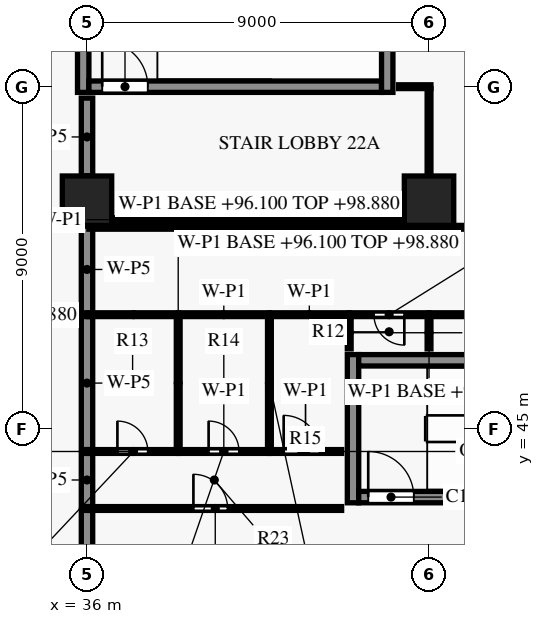
"""IFC4 building model, lengths in metres.
Left out: names, types, materials, properties, quantities, classifications, styles, units other than length and angle.
Written with IfcOpenShell. Run it as: python <this file> out.ifc"""

import sys

from ifc_helpers import new_model, si_unit, direction, frame, frame_2d, origin, origin_2d, place, context, subcontext, project, spatial, rectangle, extrude, element, fill, save


model = new_model("IFC4")
c1 = context("Model", 3, precision=1e-05, world=origin(), true_north=direction((0.0, 1.0)))
c2 = subcontext(c1, "Body", "Model", "MODEL_VIEW")
j1 = project(units=[si_unit("LENGTHUNIT", "METRE"), si_unit("PLANEANGLEUNIT", "RADIAN")], contexts=[c1])
p1 = place(None, origin())
s1 = spatial("IfcSite", under=j1, at=p1, CompositionType="ELEMENT")
p2 = place(p1, origin())
s2 = spatial("IfcBuilding", under=s1, at=p2, CompositionType="ELEMENT")
p3 = place(p2, frame((0.0, 0.0, 96.1)))
s3 = spatial("IfcBuildingStorey", under=s2, at=p3, CompositionType="ELEMENT", Elevation=96.1)
for number, where, z_axis, x_axis in (
    (1, (36.0, 51.0, 0.0), (0.0, 0.0, 1.0), (1.0, 0.0, 0.0)),
    (2, (45.0, 51.0, 0.0), (0.0, 0.0, 1.0), (1.0, 0.0, 0.0)),
):
    element("IfcColumn", number, at=place(p3, frame(where, z_axis=z_axis, x_axis=x_axis)), inside=s3, PredefinedType="COLUMN", context=c2, shape_type="SweptSolid", body=[
        extrude(rectangle(XDim=1.3, YDim=1.3, at=origin_2d()), origin(), (0.0, 0.0, 1.0), 3.8),
    ])
p4 = place(p3, frame((43.15, 43.2, 0.0), z_axis=(0.0, 0.0, 1.0), x_axis=(1.0, 0.0, 0.0)))
e3 = element("IfcWall", 3, at=p4, inside=s3, PredefinedType="SHEAR", context=c2, shape_type="SweptSolid", body=[
    extrude(rectangle(XDim=7.7, YDim=0.3, at=frame_2d((3.85, 0.0))), origin(), (0.0, 0.0, 1.0), 3.5),
])
p5 = place(p4, frame((0.25, 0.0, 0.0)))
e4 = element("IfcOpeningElement", 4, at=p5, cuts=e3, PredefinedType="OPENING", context=c2, shape_type="SweptSolid", body=[
    extrude(rectangle(XDim=1.2, YDim=2.2, at=frame_2d((0.6, 1.1))), frame((0.0, 0.16, 0.0), z_axis=(0.0, -1.0, 0.0), x_axis=(1.0, 0.0, 0.0)), (0.0, 0.0, 1.0), 0.32),
])
p6 = place(p3, frame((43.15, 46.8, 0.0), z_axis=(0.0, 0.0, 1.0), x_axis=(1.0, 0.0, 0.0)))
e5 = element("IfcWall", 5, at=p6, inside=s3, PredefinedType="SHEAR", context=c2, shape_type="SweptSolid", body=[
    extrude(rectangle(XDim=7.7, YDim=0.3, at=frame_2d((3.85, 0.0))), origin(), (0.0, 0.0, 1.0), 3.5),
])
p7 = place(p3, frame((36.05, 54.0, 0.0), z_axis=(0.0, 0.0, 1.0), x_axis=(1.0, 0.0, 0.0)))
e6 = element("IfcWall", 6, at=p7, inside=s3, PredefinedType="SHEAR", context=c2, shape_type="SweptSolid", body=[
    extrude(rectangle(XDim=7.7, YDim=0.3, at=frame_2d((3.85, 0.0))), origin(), (0.0, 0.0, 1.0), 3.5),
])
p8 = place(p7, frame((0.35, 0.0, 0.0)))
e7 = element("IfcOpeningElement", 7, at=p8, cuts=e6, PredefinedType="OPENING", context=c2, shape_type="SweptSolid", body=[
    extrude(rectangle(XDim=1.2, YDim=2.2, at=frame_2d((0.6, 1.1))), frame((0.0, 0.16, 0.0), z_axis=(0.0, -1.0, 0.0), x_axis=(1.0, 0.0, 0.0)), (0.0, 0.0, 1.0), 0.32),
])
for number, where, z_axis, x_axis in (
    (8, (35.9, 53.85, 0.0), (0.0, 0.0, 1.0), (0.0, 1.0, 0.0)),
    (9, (43.0, 43.05, 0.0), (0.0, 0.0, 1.0), (0.0, 1.0, 0.0)),
    (10, (43.9, 53.85, 0.0), (0.0, 0.0, 1.0), (0.0, 1.0, 0.0)),
):
    element("IfcWall", number, at=place(p3, frame(where, z_axis=z_axis, x_axis=x_axis)), inside=s3, PredefinedType="SHEAR", context=c2, shape_type="SweptSolid", body=[
        extrude(rectangle(XDim=3.9, YDim=0.3, at=frame_2d((1.95, 0.0))), origin(), (0.0, 0.0, 1.0), 3.5),
    ])
p9 = place(p3, frame((36.0, 39.67, 0.0), z_axis=(0.0, 0.0, 1.0), x_axis=(0.0, 1.0, 0.0)))
e11 = element("IfcWall", 11, at=p9, inside=s3, PredefinedType="PARTITIONING", context=c2, shape_type="SweptSolid", body=[
    extrude(rectangle(XDim=3.18, YDim=0.3, at=frame_2d((1.59, 0.0))), origin(), (0.0, 0.0, 1.0), 2.78),
])
p10 = place(p3, frame((36.05, 42.9, 0.0), z_axis=(0.0, 0.0, 1.0), x_axis=(1.0, 0.0, 0.0)))
e12 = element("IfcWall", 12, at=p10, inside=s3, PredefinedType="PARTITIONING", context=c2, shape_type="SweptSolid", body=[
    extrude(rectangle(XDim=6.65, YDim=0.1, at=frame_2d((3.325, 0.0))), origin(), (0.0, 0.0, 1.0), 2.78),
])
p11 = place(p10, frame((2.75, 0.0, 0.0)))
e13 = element("IfcOpeningElement", 13, at=p11, cuts=e12, PredefinedType="OPENING", context=c2, shape_type="SweptSolid", body=[
    extrude(rectangle(XDim=0.9, YDim=2.1, at=frame_2d((0.45, 1.05))), frame((0.0, 0.06, 0.0), z_axis=(0.0, -1.0, 0.0), x_axis=(1.0, 0.0, 0.0)), (0.0, 0.0, 1.0), 0.12),
])
p12 = place(p3, frame((36.0, 42.95, 0.0), z_axis=(0.0, 0.0, 1.0), x_axis=(0.0, 1.0, 0.0)))
e14 = element("IfcWall", 14, at=p12, inside=s3, PredefinedType="PARTITIONING", context=c2, shape_type="SweptSolid", body=[
    extrude(rectangle(XDim=1.4, YDim=0.3, at=frame_2d((0.7, 0.0))), origin(), (0.0, 0.0, 1.0), 2.78),
])
p13 = place(p3, frame((36.05, 44.4, 0.0), z_axis=(0.0, 0.0, 1.0), x_axis=(1.0, 0.0, 0.0)))
e15 = element("IfcWall", 15, at=p13, inside=s3, PredefinedType="PARTITIONING", context=c2, shape_type="SweptSolid", body=[
    extrude(rectangle(XDim=2.35, YDim=0.1, at=frame_2d((1.175, 0.0))), origin(), (0.0, 0.0, 1.0), 2.78),
])
p14 = place(p13, frame((0.75, 0.0, 0.0)))
e16 = element("IfcOpeningElement", 16, at=p14, cuts=e15, PredefinedType="OPENING", context=c2, shape_type="SweptSolid", body=[
    extrude(rectangle(XDim=0.8, YDim=2.1, at=frame_2d((0.4, 1.05))), frame((0.0, 0.06, 0.0), z_axis=(0.0, -1.0, 0.0), x_axis=(1.0, 0.0, 0.0)), (0.0, 0.0, 1.0), 0.12),
])
p15 = place(p3, frame((38.4, 44.4, 0.0), z_axis=(0.0, 0.0, 1.0), x_axis=(1.0, 0.0, 0.0)))
e17 = element("IfcWall", 17, at=p15, inside=s3, PredefinedType="PARTITIONING", context=c2, shape_type="SweptSolid", body=[
    extrude(rectangle(XDim=2.4, YDim=0.1, at=frame_2d((1.2, 0.0))), origin(), (0.0, 0.0, 1.0), 3.48),
])
p16 = place(p15, frame((0.8, 0.0, 0.0)))
e18 = element("IfcOpeningElement", 18, at=p16, cuts=e17, PredefinedType="OPENING", context=c2, shape_type="SweptSolid", body=[
    extrude(rectangle(XDim=0.8, YDim=2.1, at=frame_2d((0.4, 1.05))), frame((0.0, 0.06, 0.0), z_axis=(0.0, -1.0, 0.0), x_axis=(1.0, 0.0, 0.0)), (0.0, 0.0, 1.0), 0.12),
])
p17 = place(p3, frame((40.8, 44.4, 0.0), z_axis=(0.0, 0.0, 1.0), x_axis=(1.0, 0.0, 0.0)))
e19 = element("IfcWall", 19, at=p17, inside=s3, PredefinedType="PARTITIONING", context=c2, shape_type="SweptSolid", body=[
    extrude(rectangle(XDim=1.9, YDim=0.1, at=frame_2d((0.95, 0.0))), origin(), (0.0, 0.0, 1.0), 3.48),
])
p18 = place(p17, frame((0.375, 0.0, 0.0)))
e20 = element("IfcOpeningElement", 20, at=p18, cuts=e19, PredefinedType="OPENING", context=c2, shape_type="SweptSolid", body=[
    extrude(rectangle(XDim=0.95, YDim=2.1, at=frame_2d((0.475, 1.05))), frame((0.0, 0.06, 0.0), z_axis=(0.0, -1.0, 0.0), x_axis=(1.0, 0.0, 0.0)), (0.0, 0.0, 1.0), 0.12),
])
p19 = place(p3, frame((36.0, 44.45, 0.0), z_axis=(0.0, 0.0, 1.0), x_axis=(0.0, 1.0, 0.0)))
e21 = element("IfcWall", 21, at=p19, inside=s3, PredefinedType="PARTITIONING", context=c2, shape_type="SweptSolid", body=[
    extrude(rectangle(XDim=3.5, YDim=0.3, at=frame_2d((1.75, 0.0))), origin(), (0.0, 0.0, 1.0), 2.78),
])
for number, where, z_axis, x_axis in (
    (22, (38.4, 47.95, 0.0), (0.0, 0.0, 1.0), (0.0, -1.0, 0.0)),
    (23, (40.8, 47.95, 0.0), (0.0, 0.0, 1.0), (0.0, -1.0, 0.0)),
):
    element("IfcWall", number, at=place(p3, frame(where, z_axis=z_axis, x_axis=x_axis)), inside=s3, PredefinedType="PARTITIONING", context=c2, shape_type="SweptSolid", body=[
        extrude(rectangle(XDim=3.5, YDim=0.1, at=frame_2d((1.75, 0.0))), origin(), (0.0, 0.0, 1.0), 2.78),
    ])
for number, where, z_axis, x_axis in (
    (24, (42.9, 47.95, 0.0), (0.0, 0.0, 1.0), (0.0, -1.0, 0.0)),
    (25, (45.0, 47.95, 0.0), (0.0, 0.0, 1.0), (0.0, -1.0, 0.0)),
):
    element("IfcWall", number, at=place(p3, frame(where, z_axis=z_axis, x_axis=x_axis)), inside=s3, PredefinedType="PARTITIONING", context=c2, shape_type="SweptSolid", body=[
        extrude(rectangle(XDim=0.85, YDim=0.1, at=frame_2d((0.425, 0.0))), origin(), (0.0, 0.0, 1.0), 2.78),
    ])
p20 = place(p3, frame((38.4, 48.0, 0.0), z_axis=(0.0, 0.0, 1.0), x_axis=(-1.0, 0.0, 0.0)))
e26 = element("IfcWall", 26, at=p20, inside=s3, PredefinedType="PARTITIONING", context=c2, shape_type="SweptSolid", body=[
    extrude(rectangle(XDim=2.35, YDim=0.1, at=frame_2d((1.175, 0.0))), origin(), (0.0, 0.0, 1.0), 2.78),
])
p21 = place(p3, frame((40.8, 48.0, 0.0), z_axis=(0.0, 0.0, 1.0), x_axis=(-1.0, 0.0, 0.0)))
e27 = element("IfcWall", 27, at=p21, inside=s3, PredefinedType="PARTITIONING", context=c2, shape_type="SweptSolid", body=[
    extrude(rectangle(XDim=2.4, YDim=0.1, at=frame_2d((1.2, 0.0))), origin(), (0.0, 0.0, 1.0), 3.48),
])
p22 = place(p3, frame((42.9, 48.0, 0.0), z_axis=(0.0, 0.0, 1.0), x_axis=(-1.0, 0.0, 0.0)))
e28 = element("IfcWall", 28, at=p22, inside=s3, PredefinedType="PARTITIONING", context=c2, shape_type="SweptSolid", body=[
    extrude(rectangle(XDim=2.1, YDim=0.1, at=frame_2d((1.05, 0.0))), origin(), (0.0, 0.0, 1.0), 3.48),
])
p23 = place(p3, frame((45.0, 48.0, 0.0), z_axis=(0.0, 0.0, 1.0), x_axis=(-1.0, 0.0, 0.0)))
e29 = element("IfcWall", 29, at=p23, inside=s3, PredefinedType="PARTITIONING", context=c2, shape_type="SweptSolid", body=[
    extrude(rectangle(XDim=2.1, YDim=0.1, at=frame_2d((1.05, 0.0))), origin(), (0.0, 0.0, 1.0), 2.88),
])
p24 = place(p23, frame((0.65, 0.0, 0.0)))
e30 = element("IfcOpeningElement", 30, at=p24, cuts=e29, PredefinedType="OPENING", context=c2, shape_type="SweptSolid", body=[
    extrude(rectangle(XDim=0.8, YDim=2.1, at=frame_2d((0.4, 1.05))), frame((0.0, 0.06, 0.0), z_axis=(0.0, -1.0, 0.0), x_axis=(1.0, 0.0, 0.0)), (0.0, 0.0, 1.0), 0.12),
])
p25 = place(p3, frame((54.0, 48.0, 0.0), z_axis=(0.0, 0.0, 1.0), x_axis=(-1.0, 0.0, 0.0)))
e31 = element("IfcWall", 31, at=p25, inside=s3, PredefinedType="PARTITIONING", context=c2, shape_type="SweptSolid", body=[
    extrude(rectangle(XDim=9.0, YDim=0.1, at=frame_2d((4.5, 0.0))), origin(), (0.0, 0.0, 1.0), 2.88),
])
p26 = place(p3, frame((36.0, 48.05, 0.0), z_axis=(0.0, 0.0, 1.0), x_axis=(0.0, 1.0, 0.0)))
e32 = element("IfcWall", 32, at=p26, inside=s3, PredefinedType="PARTITIONING", context=c2, shape_type="SweptSolid", body=[
    extrude(rectangle(XDim=2.28, YDim=0.3, at=frame_2d((1.14, 0.0))), origin(), (0.0, 0.0, 1.0), 2.78),
])
p27 = place(p3, frame((36.05, 50.3, 0.0), z_axis=(0.0, 0.0, 1.0), x_axis=(1.0, 0.0, 0.0)))
e33 = element("IfcWall", 33, at=p27, inside=s3, PredefinedType="PARTITIONING", context=c2, shape_type="SweptSolid", body=[
    extrude(rectangle(XDim=8.95, YDim=0.1, at=frame_2d((4.475, 0.0))), origin(), (0.0, 0.0, 1.0), 2.78),
])
p28 = place(p3, frame((45.0, 50.3, 0.0), z_axis=(0.0, 0.0, 1.0), x_axis=(1.0, 0.0, 0.0)))
e34 = element("IfcWall", 34, at=p28, inside=s3, PredefinedType="PARTITIONING", context=c2, shape_type="SweptSolid", body=[
    extrude(rectangle(XDim=13.5, YDim=0.1, at=frame_2d((6.75, 0.0))), origin(), (0.0, 0.0, 1.0), 2.88),
])
p29 = place(p28, frame((4.05, 0.0, 0.0)))
e35 = element("IfcOpeningElement", 35, at=p29, cuts=e34, PredefinedType="OPENING", context=c2, shape_type="SweptSolid", body=[
    extrude(rectangle(XDim=0.9, YDim=2.1, at=frame_2d((0.45, 1.05))), frame((0.0, 0.06, 0.0), z_axis=(0.0, -1.0, 0.0), x_axis=(1.0, 0.0, 0.0)), (0.0, 0.0, 1.0), 0.12),
])
p30 = place(p3, frame((44.345, 50.5, 0.0), z_axis=(0.0, 0.0, 1.0), x_axis=(-1.0, 0.0, 0.0)))
e36 = element("IfcWall", 36, at=p30, inside=s3, PredefinedType="PARTITIONING", context=c2, shape_type="SweptSolid", body=[
    extrude(rectangle(XDim=7.69, YDim=0.1, at=frame_2d((3.845, 0.0))), origin(), (0.0, 0.0, 1.0), 3.48),
])
p31 = place(p3, frame((36.0, 51.655, 0.0), z_axis=(0.0, 0.0, 1.0), x_axis=(0.0, 1.0, 0.0)))
e37 = element("IfcWall", 37, at=p31, inside=s3, PredefinedType="PARTITIONING", context=c2, shape_type="SweptSolid", body=[
    extrude(rectangle(XDim=2.045, YDim=0.3, at=frame_2d((1.022, 0.0))), origin(), (0.0, 0.0, 1.0), 2.78),
])
p32 = place(p3, frame((45.0, 53.95, 0.0), z_axis=(0.0, 0.0, 1.0), x_axis=(0.0, -1.0, 0.0)))
e38 = element("IfcWall", 38, at=p32, inside=s3, PredefinedType="PARTITIONING", context=c2, shape_type="SweptSolid", body=[
    extrude(rectangle(XDim=2.295, YDim=0.1, at=frame_2d((1.147, 0.0))), origin(), (0.0, 0.0, 1.0), 2.88),
])
p33 = place(p3, frame((44.2, 54.0, 0.0), z_axis=(0.0, 0.0, 1.0), x_axis=(1.0, 0.0, 0.0)))
e39 = element("IfcWall", 39, at=p33, inside=s3, PredefinedType="PARTITIONING", context=c2, shape_type="SweptSolid", body=[
    extrude(rectangle(XDim=0.85, YDim=0.1, at=frame_2d((0.425, 0.0))), origin(), (0.0, 0.0, 1.0), 2.88),
])
p34 = place(p8, origin())
e40 = element("IfcDoor", 40, at=p34, inside=s3, OperationType="SINGLE_SWING_LEFT", PredefinedType="DOOR", context=c2, shape_type="SweptSolid", body=[
    extrude(rectangle(XDim=1.2, YDim=2.2, at=frame_2d((0.6, 1.1))), frame((0.0, 0.025, 0.0), z_axis=(0.0, -1.0, 0.0), x_axis=(1.0, 0.0, 0.0)), (0.0, 0.0, 1.0), 0.05),
])
fill(e7, e40)
p35 = place(p5, origin())
e41 = element("IfcDoor", 41, at=p35, inside=s3, OperationType="SINGLE_SWING_RIGHT", PredefinedType="DOOR", context=c2, shape_type="SweptSolid", body=[
    extrude(rectangle(XDim=1.2, YDim=2.2, at=frame_2d((0.6, 1.1))), frame((0.0, 0.025, 0.0), z_axis=(0.0, -1.0, 0.0), x_axis=(1.0, 0.0, 0.0)), (0.0, 0.0, 1.0), 0.05),
])
fill(e4, e41)
p36 = place(p11, origin())
e42 = element("IfcDoor", 42, at=p36, inside=s3, OperationType="SINGLE_SWING_LEFT", PredefinedType="DOOR", context=c2, shape_type="SweptSolid", body=[
    extrude(rectangle(XDim=0.9, YDim=2.1, at=frame_2d((0.45, 1.05))), frame((0.0, 0.025, 0.0), z_axis=(0.0, -1.0, 0.0), x_axis=(1.0, 0.0, 0.0)), (0.0, 0.0, 1.0), 0.05),
])
fill(e13, e42)
p37 = place(p14, origin())
e43 = element("IfcDoor", 43, at=p37, inside=s3, OperationType="SINGLE_SWING_LEFT", PredefinedType="DOOR", context=c2, shape_type="SweptSolid", body=[
    extrude(rectangle(XDim=0.8, YDim=2.1, at=frame_2d((0.4, 1.05))), frame((0.0, 0.025, 0.0), z_axis=(0.0, -1.0, 0.0), x_axis=(1.0, 0.0, 0.0)), (0.0, 0.0, 1.0), 0.05),
])
fill(e16, e43)
p38 = place(p16, origin())
e44 = element("IfcDoor", 44, at=p38, inside=s3, OperationType="SINGLE_SWING_RIGHT", PredefinedType="DOOR", context=c2, shape_type="SweptSolid", body=[
    extrude(rectangle(XDim=0.8, YDim=2.1, at=frame_2d((0.4, 1.05))), frame((0.0, 0.025, 0.0), z_axis=(0.0, -1.0, 0.0), x_axis=(1.0, 0.0, 0.0)), (0.0, 0.0, 1.0), 0.05),
])
fill(e18, e44)
p39 = place(p18, origin())
e45 = element("IfcDoor", 45, at=p39, inside=s3, OperationType="SINGLE_SWING_LEFT", PredefinedType="DOOR", context=c2, shape_type="SweptSolid", body=[
    extrude(rectangle(XDim=0.95, YDim=2.1, at=frame_2d((0.475, 1.05))), frame((0.0, 0.025, 0.0), z_axis=(0.0, -1.0, 0.0), x_axis=(1.0, 0.0, 0.0)), (0.0, 0.0, 1.0), 0.05),
])
fill(e20, e45)
p40 = place(p24, origin())
e46 = element("IfcDoor", 46, at=p40, inside=s3, OperationType="SINGLE_SWING_LEFT", PredefinedType="DOOR", context=c2, shape_type="SweptSolid", body=[
    extrude(rectangle(XDim=0.8, YDim=2.1, at=frame_2d((0.4, 1.05))), frame((0.0, 0.025, 0.0), z_axis=(0.0, -1.0, 0.0), x_axis=(1.0, 0.0, 0.0)), (0.0, 0.0, 1.0), 0.05),
])
fill(e30, e46)
save(model, sys.argv[1])
